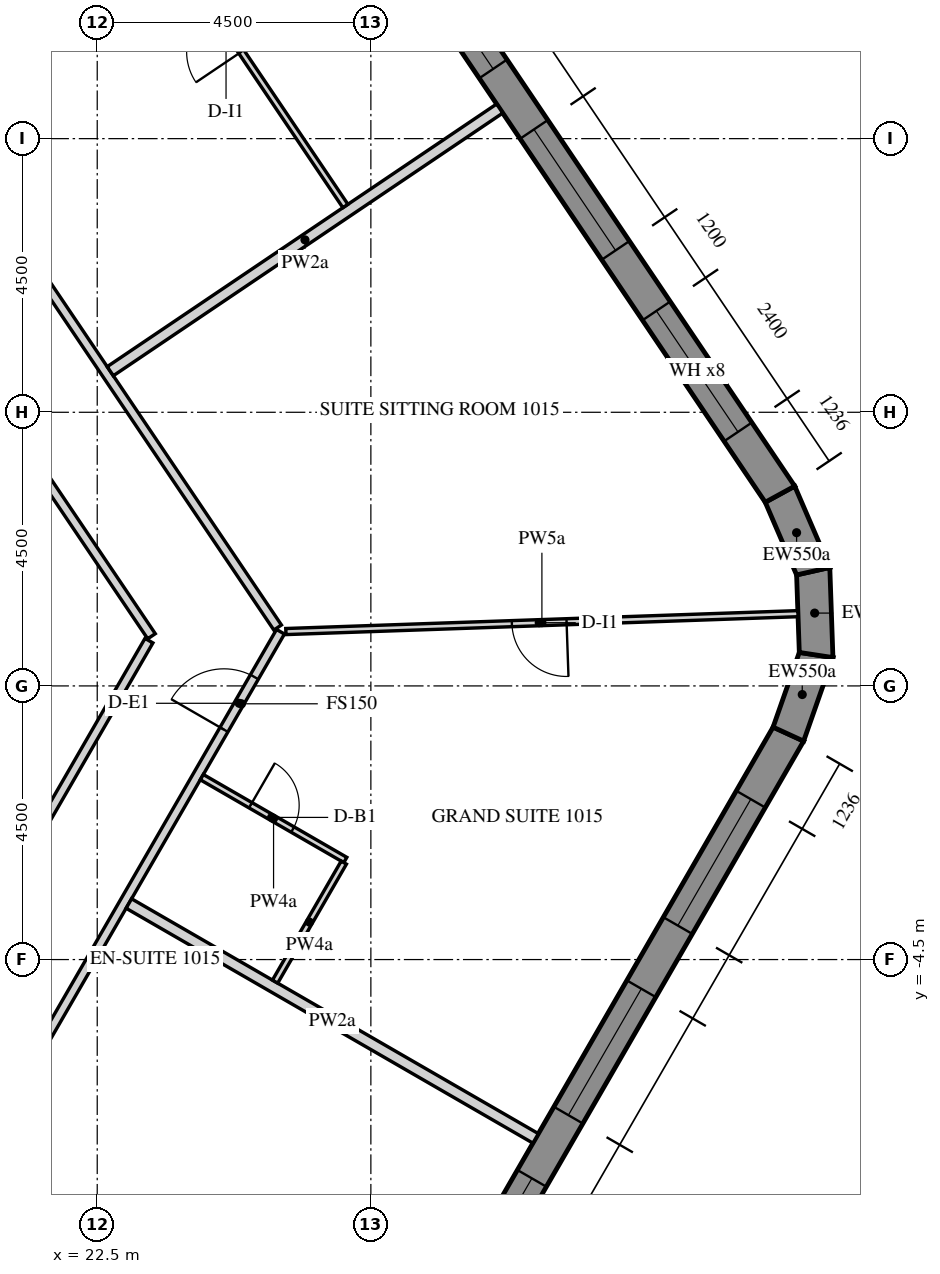
"""IFC4 building model, lengths in metres.
Left out: names, types, materials, properties, quantities, classifications, styles, units other than length and angle.
Written with IfcOpenShell. Run it as: python <this file> out.ifc"""

import sys

from ifc_helpers import new_model, si_unit, direction, frame, frame_2d, origin, place, context, subcontext, project, spatial, polyline, rectangle, outline, extrude, element, fill, save


model = new_model("IFC4")
c1 = context("Model", 3, precision=1e-05, world=origin(), true_north=direction((0.0, 1.0)))
c2 = subcontext(c1, "Body", "Model", "MODEL_VIEW")
j1 = project(units=[si_unit("LENGTHUNIT", "METRE"), si_unit("PLANEANGLEUNIT", "RADIAN")], contexts=[c1])
p1 = place(None, origin())
s1 = spatial("IfcSite", under=j1, at=p1, CompositionType="ELEMENT")
p2 = place(p1, origin())
s2 = spatial("IfcBuilding", under=s1, at=p2, CompositionType="ELEMENT")
p3 = place(p2, frame((0.0, 0.0, 142.8)))
s3 = spatial("IfcBuildingStorey", under=s2, at=p3, CompositionType="ELEMENT", Elevation=142.8)
p4 = place(p3, frame((18.83, -26.835, -0.15), z_axis=(0.0, 0.0, 1.0), x_axis=(0.500003800416, 0.866023209602, 0.0)))
e1 = element("IfcWall", 1, at=p4, inside=s3, PredefinedType="SOLIDWALL", context=c2, shape_type="SweptSolid", body=[
    extrude(outline(polyline([(-0.022, -0.275), (30.097, -0.275), (30.045, 0.275), (0.022, 0.275), (-0.022, -0.275)])), origin(), (0.0, 0.0, 1.0), 3.75),
])
p5 = place(p4, frame((1.236, 0.0, 1.05)))
e2 = element("IfcOpeningElement", 2, at=p5, cuts=e1, PredefinedType="OPENING", context=c2, shape_type="SweptSolid", body=[
    extrude(rectangle(XDim=2.4, YDim=2.4, at=frame_2d((1.2, 1.2))), frame((0.0, 0.285, 0.0), z_axis=(0.0, -1.0, 0.0), x_axis=(1.0, 0.0, 0.0)), (0.0, 0.0, 1.0), 0.57),
])
p6 = place(p4, frame((4.835, 0.0, 1.05)))
e3 = element("IfcOpeningElement", 3, at=p6, cuts=e1, PredefinedType="OPENING", context=c2, shape_type="SweptSolid", body=[
    extrude(rectangle(XDim=2.4, YDim=2.4, at=frame_2d((1.2, 1.2))), frame((0.0, 0.285, 0.0), z_axis=(0.0, -1.0, 0.0), x_axis=(1.0, 0.0, 0.0)), (0.0, 0.0, 1.0), 0.57),
])
p7 = place(p4, frame((8.436, 0.0, 1.05)))
e4 = element("IfcOpeningElement", 4, at=p7, cuts=e1, PredefinedType="OPENING", context=c2, shape_type="SweptSolid", body=[
    extrude(rectangle(XDim=2.4, YDim=2.4, at=frame_2d((1.2, 1.2))), frame((0.0, 0.285, 0.0), z_axis=(0.0, -1.0, 0.0), x_axis=(1.0, 0.0, 0.0)), (0.0, 0.0, 1.0), 0.57),
])
p8 = place(p4, frame((12.035, 0.0, 1.05)))
e5 = element("IfcOpeningElement", 5, at=p8, cuts=e1, PredefinedType="OPENING", context=c2, shape_type="SweptSolid", body=[
    extrude(rectangle(XDim=2.4, YDim=2.4, at=frame_2d((1.2, 1.2))), frame((0.0, 0.285, 0.0), z_axis=(0.0, -1.0, 0.0), x_axis=(1.0, 0.0, 0.0)), (0.0, 0.0, 1.0), 0.57),
])
p9 = place(p4, frame((15.635, 0.0, 1.05)))
e6 = element("IfcOpeningElement", 6, at=p9, cuts=e1, PredefinedType="OPENING", context=c2, shape_type="SweptSolid", body=[
    extrude(rectangle(XDim=2.4, YDim=2.4, at=frame_2d((1.2, 1.2))), frame((0.0, 0.285, 0.0), z_axis=(0.0, -1.0, 0.0), x_axis=(1.0, 0.0, 0.0)), (0.0, 0.0, 1.0), 0.57),
])
p10 = place(p4, frame((19.236, 0.0, 1.05)))
e7 = element("IfcOpeningElement", 7, at=p10, cuts=e1, PredefinedType="OPENING", context=c2, shape_type="SweptSolid", body=[
    extrude(rectangle(XDim=2.4, YDim=2.4, at=frame_2d((1.2, 1.2))), frame((0.0, 0.285, 0.0), z_axis=(0.0, -1.0, 0.0), x_axis=(1.0, 0.0, 0.0)), (0.0, 0.0, 1.0), 0.57),
])
p11 = place(p4, frame((22.835, 0.0, 1.05)))
e8 = element("IfcOpeningElement", 8, at=p11, cuts=e1, PredefinedType="OPENING", context=c2, shape_type="SweptSolid", body=[
    extrude(rectangle(XDim=2.4, YDim=2.4, at=frame_2d((1.2, 1.2))), frame((0.0, 0.285, 0.0), z_axis=(0.0, -1.0, 0.0), x_axis=(1.0, 0.0, 0.0)), (0.0, 0.0, 1.0), 0.57),
])
p12 = place(p4, frame((26.436, 0.0, 1.05)))
e9 = element("IfcOpeningElement", 9, at=p12, cuts=e1, PredefinedType="OPENING", context=c2, shape_type="SweptSolid", body=[
    extrude(rectangle(XDim=2.4, YDim=2.4, at=frame_2d((1.2, 1.2))), frame((0.0, 0.285, 0.0), z_axis=(0.0, -1.0, 0.0), x_axis=(1.0, 0.0, 0.0)), (0.0, 0.0, 1.0), 0.57),
])
p13 = place(p3, frame((33.866, -0.792, -0.15), z_axis=(0.0, 0.0, 1.0), x_axis=(0.33111537203, 0.943590276765, 0.0)))
e10 = element("IfcWall", 10, at=p13, inside=s3, PredefinedType="SOLIDWALL", context=c2, shape_type="SweptSolid", body=[
    extrude(outline(polyline([(-0.026, -0.275), (1.431, -0.275), (1.327, 0.275), (0.026, 0.275), (-0.026, -0.275)])), origin(), (0.0, 0.0, 1.0), 3.75),
])
p14 = place(p3, frame((34.323, 0.509, -0.15), z_axis=(0.0, 0.0, 1.0), x_axis=(-0.034876908462, 0.999391615562, 0.0)))
e11 = element("IfcWall", 11, at=p14, inside=s3, PredefinedType="SOLIDWALL", context=c2, shape_type="SweptSolid", body=[
    extrude(outline(polyline([(-0.052, -0.275), (1.431, -0.275), (1.327, 0.275), (0.052, 0.275), (-0.052, -0.275)])), origin(), (0.0, 0.0, 1.0), 3.75),
])
p15 = place(p3, frame((34.274, 1.887, -0.15), z_axis=(0.0, 0.0, 1.0), x_axis=(-0.396161342798, 0.918180913803, 0.0)))
e12 = element("IfcWall", 12, at=p15, inside=s3, PredefinedType="SOLIDWALL", context=c2, shape_type="SweptSolid", body=[
    extrude(outline(polyline([(-0.052, -0.275), (1.405, -0.275), (1.354, 0.275), (0.052, 0.275), (-0.052, -0.275)])), origin(), (0.0, 0.0, 1.0), 3.75),
])
p16 = place(p3, frame((33.728, 3.153, -0.15), z_axis=(0.0, 0.0, 1.0), x_axis=(-0.559192411416, 0.82903790445, 0.0)))
e13 = element("IfcWall", 13, at=p16, inside=s3, PredefinedType="SOLIDWALL", context=c2, shape_type="SweptSolid", body=[
    extrude(outline(polyline([(-0.026, -0.275), (30.093, -0.275), (30.048, 0.275), (0.026, 0.275), (-0.026, -0.275)])), origin(), (0.0, 0.0, 1.0), 3.75),
])
p17 = place(p16, frame((1.236, 0.0, 1.05)))
e14 = element("IfcOpeningElement", 14, at=p17, cuts=e13, PredefinedType="OPENING", context=c2, shape_type="SweptSolid", body=[
    extrude(rectangle(XDim=2.4, YDim=2.4, at=frame_2d((1.2, 1.2))), frame((0.0, 0.285, 0.0), z_axis=(0.0, -1.0, 0.0), x_axis=(1.0, 0.0, 0.0)), (0.0, 0.0, 1.0), 0.57),
])
p18 = place(p16, frame((4.835, 0.0, 1.05)))
e15 = element("IfcOpeningElement", 15, at=p18, cuts=e13, PredefinedType="OPENING", context=c2, shape_type="SweptSolid", body=[
    extrude(rectangle(XDim=2.4, YDim=2.4, at=frame_2d((1.2, 1.2))), frame((0.0, 0.285, 0.0), z_axis=(0.0, -1.0, 0.0), x_axis=(1.0, 0.0, 0.0)), (0.0, 0.0, 1.0), 0.57),
])
p19 = place(p16, frame((8.436, 0.0, 1.05)))
e16 = element("IfcOpeningElement", 16, at=p19, cuts=e13, PredefinedType="OPENING", context=c2, shape_type="SweptSolid", body=[
    extrude(rectangle(XDim=2.4, YDim=2.4, at=frame_2d((1.2, 1.2))), frame((0.0, 0.285, 0.0), z_axis=(0.0, -1.0, 0.0), x_axis=(1.0, 0.0, 0.0)), (0.0, 0.0, 1.0), 0.57),
])
p20 = place(p16, frame((12.035, 0.0, 1.05)))
e17 = element("IfcOpeningElement", 17, at=p20, cuts=e13, PredefinedType="OPENING", context=c2, shape_type="SweptSolid", body=[
    extrude(rectangle(XDim=2.4, YDim=2.4, at=frame_2d((1.2, 1.2))), frame((0.0, 0.285, 0.0), z_axis=(0.0, -1.0, 0.0), x_axis=(1.0, 0.0, 0.0)), (0.0, 0.0, 1.0), 0.57),
])
p21 = place(p16, frame((15.635, 0.0, 1.05)))
e18 = element("IfcOpeningElement", 18, at=p21, cuts=e13, PredefinedType="OPENING", context=c2, shape_type="SweptSolid", body=[
    extrude(rectangle(XDim=2.4, YDim=2.4, at=frame_2d((1.2, 1.2))), frame((0.0, 0.285, 0.0), z_axis=(0.0, -1.0, 0.0), x_axis=(1.0, 0.0, 0.0)), (0.0, 0.0, 1.0), 0.57),
])
p22 = place(p16, frame((19.236, 0.0, 1.05)))
e19 = element("IfcOpeningElement", 19, at=p22, cuts=e13, PredefinedType="OPENING", context=c2, shape_type="SweptSolid", body=[
    extrude(rectangle(XDim=2.4, YDim=2.4, at=frame_2d((1.2, 1.2))), frame((0.0, 0.285, 0.0), z_axis=(0.0, -1.0, 0.0), x_axis=(1.0, 0.0, 0.0)), (0.0, 0.0, 1.0), 0.57),
])
p23 = place(p16, frame((22.835, 0.0, 1.05)))
e20 = element("IfcOpeningElement", 20, at=p23, cuts=e13, PredefinedType="OPENING", context=c2, shape_type="SweptSolid", body=[
    extrude(rectangle(XDim=2.4, YDim=2.4, at=frame_2d((1.2, 1.2))), frame((0.0, 0.285, 0.0), z_axis=(0.0, -1.0, 0.0), x_axis=(1.0, 0.0, 0.0)), (0.0, 0.0, 1.0), 0.57),
])
p24 = place(p16, frame((26.436, 0.0, 1.05)))
e21 = element("IfcOpeningElement", 21, at=p24, cuts=e13, PredefinedType="OPENING", context=c2, shape_type="SweptSolid", body=[
    extrude(rectangle(XDim=2.4, YDim=2.4, at=frame_2d((1.2, 1.2))), frame((0.0, 0.285, 0.0), z_axis=(0.0, -1.0, 0.0), x_axis=(1.0, 0.0, 0.0)), (0.0, 0.0, 1.0), 0.57),
])
p25 = place(p3, frame((13.755, -19.475, 0.0), z_axis=(0.0, 0.0, 1.0), x_axis=(0.50000013933, 0.866025323342, 0.0)))
e22 = element("IfcWall", 22, at=p25, inside=s3, PredefinedType="PARTITIONING", context=c2, shape_type="SweptSolid", body=[
    extrude(rectangle(XDim=23.517, YDim=0.15, at=frame_2d((11.758, 0.0))), origin(), (0.0, 0.0, 1.0), 2.838),
])
p26 = place(p25, frame((4.456, 0.0, 0.0)))
e23 = element("IfcOpeningElement", 23, at=p26, cuts=e22, PredefinedType="OPENING", context=c2, shape_type="SweptSolid", body=[
    extrude(rectangle(XDim=1.0, YDim=2.1, at=frame_2d((0.5, 1.05))), frame((0.0, 0.085, 0.0), z_axis=(0.0, -1.0, 0.0), x_axis=(1.0, 0.0, 0.0)), (0.0, 0.0, 1.0), 0.17),
])
p27 = place(p25, frame((13.699, 0.0, 0.0)))
e24 = element("IfcOpeningElement", 24, at=p27, cuts=e22, PredefinedType="OPENING", context=c2, shape_type="SweptSolid", body=[
    extrude(rectangle(XDim=1.0, YDim=2.1, at=frame_2d((0.5, 1.05))), frame((0.0, 0.085, 0.0), z_axis=(0.0, -1.0, 0.0), x_axis=(1.0, 0.0, 0.0)), (0.0, 0.0, 1.0), 0.17),
])
p28 = place(p25, frame((21.658, 0.0, 0.0)))
e25 = element("IfcOpeningElement", 25, at=p28, cuts=e22, PredefinedType="OPENING", context=c2, shape_type="SweptSolid", body=[
    extrude(rectangle(XDim=1.0, YDim=2.1, at=frame_2d((0.5, 1.05))), frame((0.0, 0.085, 0.0), z_axis=(0.0, -1.0, 0.0), x_axis=(1.0, 0.0, 0.0)), (0.0, 0.0, 1.0), 0.17),
])
p29 = place(p3, frame((25.467, 0.96, 0.0), z_axis=(0.0, 0.0, 1.0), x_axis=(-0.559200743185, 0.829032284547, 0.0)))
e26 = element("IfcWall", 26, at=p29, inside=s3, PredefinedType="PARTITIONING", context=c2, shape_type="SweptSolid", body=[
    extrude(rectangle(XDim=21.668, YDim=0.15, at=frame_2d((10.834, 0.0))), origin(), (0.0, 0.0, 1.0), 2.838),
])
p30 = place(p29, frame((10.434, 0.0, 0.0)))
e27 = element("IfcOpeningElement", 27, at=p30, cuts=e26, PredefinedType="OPENING", context=c2, shape_type="SweptSolid", body=[
    extrude(rectangle(XDim=1.0, YDim=2.1, at=frame_2d((0.5, 1.05))), frame((0.0, 0.085, 0.0), z_axis=(0.0, -1.0, 0.0), x_axis=(1.0, 0.0, 0.0)), (0.0, 0.0, 1.0), 0.17),
])
p31 = place(p3, frame((17.879, 8.99, 0.0), z_axis=(0.0, 0.0, 1.0), x_axis=(0.559189565351, -0.829039824136, 0.0)))
e28 = element("IfcWall", 28, at=p31, inside=s3, PredefinedType="PARTITIONING", context=c2, shape_type="SweptSolid", body=[
    extrude(rectangle(XDim=9.859, YDim=0.15, at=frame_2d((4.929, 0.0))), origin(), (0.0, 0.0, 1.0), 2.838),
])
p32 = place(p3, frame((23.351, 0.745, 0.0), z_axis=(0.0, 0.0, 1.0), x_axis=(-0.500009458068, -0.866019943097, 0.0)))
e29 = element("IfcWall", 29, at=p32, inside=s3, PredefinedType="PARTITIONING", context=c2, shape_type="SweptSolid", body=[
    extrude(rectangle(XDim=11.241, YDim=0.15, at=frame_2d((5.621, 0.0))), origin(), (0.0, 0.0, 1.0), 2.838),
])
p33 = place(p32, frame((5.171, 0.0, 0.0)))
e30 = element("IfcOpeningElement", 30, at=p33, cuts=e29, PredefinedType="OPENING", context=c2, shape_type="SweptSolid", body=[
    extrude(rectangle(XDim=0.9, YDim=2.1, at=frame_2d((0.45, 1.05))), frame((0.0, 0.085, 0.0), z_axis=(0.0, -1.0, 0.0), x_axis=(1.0, 0.0, 0.0)), (0.0, 0.0, 1.0), 0.17),
])
p34 = place(p3, frame((29.71, -7.441, 0.0), z_axis=(0.0, 0.0, 1.0), x_axis=(-0.866019273868, 0.500010617176, 0.0)))
e31 = element("IfcWall", 31, at=p34, inside=s3, PredefinedType="PARTITIONING", context=c2, shape_type="SweptSolid", body=[
    extrude(rectangle(XDim=7.725, YDim=0.18, at=frame_2d((3.862, 0.0))), origin(), (0.0, 0.0, 1.0), 2.838),
])
p35 = place(p3, frame((24.22, -1.5, 0.0), z_axis=(0.0, 0.0, 1.0), x_axis=(0.866012511928, -0.500022328685, 0.0)))
e32 = element("IfcWall", 32, at=p35, inside=s3, PredefinedType="PARTITIONING", context=c2, shape_type="SweptSolid", body=[
    extrude(rectangle(XDim=2.725, YDim=0.1, at=frame_2d((1.363, 0.0))), origin(), (0.0, 0.0, 1.0), 2.838),
])
p36 = place(p35, frame((0.925, 0.0, 0.0)))
e33 = element("IfcOpeningElement", 33, at=p36, cuts=e32, PredefinedType="OPENING", context=c2, shape_type="SweptSolid", body=[
    extrude(rectangle(XDim=0.8, YDim=2.1, at=frame_2d((0.4, 1.05))), frame((0.0, 0.06, 0.0), z_axis=(0.0, -1.0, 0.0), x_axis=(1.0, 0.0, 0.0)), (0.0, 0.0, 1.0), 0.12),
])
p37 = place(p3, frame((26.555, -2.906, 0.0), z_axis=(0.0, 0.0, 1.0), x_axis=(-0.500077800282, -0.865980481111, 0.0)))
e34 = element("IfcWall", 34, at=p37, inside=s3, PredefinedType="PARTITIONING", context=c2, shape_type="SweptSolid", body=[
    extrude(rectangle(XDim=2.26, YDim=0.1, at=frame_2d((1.13, 0.0))), origin(), (0.0, 0.0, 1.0), 2.838),
])
p38 = place(p3, frame((34.023, 1.188, 0.0), z_axis=(0.0, 0.0, 1.0), x_axis=(-0.999390379298, -0.03491231539, 0.0)))
e35 = element("IfcWall", 35, at=p38, inside=s3, PredefinedType="PARTITIONING", context=c2, shape_type="SweptSolid", body=[
    extrude(rectangle(XDim=8.427, YDim=0.1, at=frame_2d((4.213, 0.0))), origin(), (0.0, 0.0, 1.0), 2.838),
])
p39 = place(p38, frame((3.808, 0.0, 0.0)))
e36 = element("IfcOpeningElement", 36, at=p39, cuts=e35, PredefinedType="OPENING", context=c2, shape_type="SweptSolid", body=[
    extrude(rectangle(XDim=0.9, YDim=2.1, at=frame_2d((0.45, 1.05))), frame((0.0, 0.06, 0.0), z_axis=(0.0, -1.0, 0.0), x_axis=(1.0, 0.0, 0.0)), (0.0, 0.0, 1.0), 0.12),
])
p40 = place(p3, frame((29.119, 9.495, 0.0), z_axis=(0.0, 0.0, 1.0), x_axis=(-0.82903328576, -0.559199258853, 0.0)))
e37 = element("IfcWall", 37, at=p40, inside=s3, PredefinedType="PARTITIONING", context=c2, shape_type="SweptSolid", body=[
    extrude(rectangle(XDim=7.725, YDim=0.18, at=frame_2d((3.863, 0.0))), origin(), (0.0, 0.0, 1.0), 2.838),
])
p41 = place(p3, frame((26.581, 7.892, 0.0), z_axis=(0.0, 0.0, 1.0), x_axis=(-0.559185029686, 0.829042883435, 0.0)))
e38 = element("IfcWall", 38, at=p41, inside=s3, PredefinedType="PARTITIONING", context=c2, shape_type="SweptSolid", body=[
    extrude(rectangle(XDim=7.11, YDim=0.1, at=frame_2d((3.555, 0.0))), origin(), (0.0, 0.0, 1.0), 2.838),
])
p42 = place(p41, frame((3.06, 0.0, 0.0)))
e39 = element("IfcOpeningElement", 39, at=p42, cuts=e38, PredefinedType="OPENING", context=c2, shape_type="SweptSolid", body=[
    extrude(rectangle(XDim=0.9, YDim=2.1, at=frame_2d((0.45, 1.05))), frame((0.0, 0.06, 0.0), z_axis=(0.0, -1.0, 0.0), x_axis=(1.0, 0.0, 0.0)), (0.0, 0.0, 1.0), 0.12),
])
p43 = place(p10, frame((0.0, 0.205, 0.0)))
e40 = element("IfcWindow", 40, at=p43, inside=s3, PartitioningType="DOUBLE_PANEL_VERTICAL", PredefinedType="WINDOW", context=c2, shape_type="SweptSolid", body=[
    extrude(rectangle(XDim=2.4, YDim=2.4, at=frame_2d((1.2, 1.2))), frame((0.0, 0.03, 0.0), z_axis=(0.0, -1.0, 0.0), x_axis=(1.0, 0.0, 0.0)), (0.0, 0.0, 1.0), 0.06),
])
fill(e7, e40)
p44 = place(p11, frame((0.0, 0.205, 0.0)))
e41 = element("IfcWindow", 41, at=p44, inside=s3, PartitioningType="DOUBLE_PANEL_VERTICAL", PredefinedType="WINDOW", context=c2, shape_type="SweptSolid", body=[
    extrude(rectangle(XDim=2.4, YDim=2.4, at=frame_2d((1.2, 1.2))), frame((0.0, 0.03, 0.0), z_axis=(0.0, -1.0, 0.0), x_axis=(1.0, 0.0, 0.0)), (0.0, 0.0, 1.0), 0.06),
])
fill(e8, e41)
p45 = place(p12, frame((0.0, 0.205, 0.0)))
e42 = element("IfcWindow", 42, at=p45, inside=s3, PartitioningType="DOUBLE_PANEL_VERTICAL", PredefinedType="WINDOW", context=c2, shape_type="SweptSolid", body=[
    extrude(rectangle(XDim=2.4, YDim=2.4, at=frame_2d((1.2, 1.2))), frame((0.0, 0.03, 0.0), z_axis=(0.0, -1.0, 0.0), x_axis=(1.0, 0.0, 0.0)), (0.0, 0.0, 1.0), 0.06),
])
fill(e9, e42)
p46 = place(p17, frame((0.0, 0.205, 0.0)))
e43 = element("IfcWindow", 43, at=p46, inside=s3, PartitioningType="DOUBLE_PANEL_VERTICAL", PredefinedType="WINDOW", context=c2, shape_type="SweptSolid", body=[
    extrude(rectangle(XDim=2.4, YDim=2.4, at=frame_2d((1.2, 1.2))), frame((0.0, 0.03, 0.0), z_axis=(0.0, -1.0, 0.0), x_axis=(1.0, 0.0, 0.0)), (0.0, 0.0, 1.0), 0.06),
])
fill(e14, e43)
p47 = place(p18, frame((0.0, 0.205, 0.0)))
e44 = element("IfcWindow", 44, at=p47, inside=s3, PartitioningType="DOUBLE_PANEL_VERTICAL", PredefinedType="WINDOW", context=c2, shape_type="SweptSolid", body=[
    extrude(rectangle(XDim=2.4, YDim=2.4, at=frame_2d((1.2, 1.2))), frame((0.0, 0.03, 0.0), z_axis=(0.0, -1.0, 0.0), x_axis=(1.0, 0.0, 0.0)), (0.0, 0.0, 1.0), 0.06),
])
fill(e15, e44)
p48 = place(p19, frame((0.0, 0.205, 0.0)))
e45 = element("IfcWindow", 45, at=p48, inside=s3, PartitioningType="DOUBLE_PANEL_VERTICAL", PredefinedType="WINDOW", context=c2, shape_type="SweptSolid", body=[
    extrude(rectangle(XDim=2.4, YDim=2.4, at=frame_2d((1.2, 1.2))), frame((0.0, 0.03, 0.0), z_axis=(0.0, -1.0, 0.0), x_axis=(1.0, 0.0, 0.0)), (0.0, 0.0, 1.0), 0.06),
])
fill(e16, e45)
p49 = place(p28, origin())
e46 = element("IfcDoor", 46, at=p49, inside=s3, OperationType="SINGLE_SWING_RIGHT", PredefinedType="DOOR", context=c2, shape_type="SweptSolid", body=[
    extrude(rectangle(XDim=1.0, YDim=2.1, at=frame_2d((0.5, 1.05))), frame((0.0, 0.025, 0.0), z_axis=(0.0, -1.0, 0.0), x_axis=(1.0, 0.0, 0.0)), (0.0, 0.0, 1.0), 0.05),
])
fill(e25, e46)
p50 = place(p36, origin())
e47 = element("IfcDoor", 47, at=p50, inside=s3, OperationType="SINGLE_SWING_RIGHT", PredefinedType="DOOR", context=c2, shape_type="SweptSolid", body=[
    extrude(rectangle(XDim=0.8, YDim=2.1, at=frame_2d((0.4, 1.05))), frame((0.0, 0.025, 0.0), z_axis=(0.0, -1.0, 0.0), x_axis=(1.0, 0.0, 0.0)), (0.0, 0.0, 1.0), 0.05),
])
fill(e33, e47)
p51 = place(p39, origin())
e48 = element("IfcDoor", 48, at=p51, inside=s3, OperationType="SINGLE_SWING_LEFT", PredefinedType="DOOR", context=c2, shape_type="SweptSolid", body=[
    extrude(rectangle(XDim=0.9, YDim=2.1, at=frame_2d((0.45, 1.05))), frame((0.0, 0.025, 0.0), z_axis=(0.0, -1.0, 0.0), x_axis=(1.0, 0.0, 0.0)), (0.0, 0.0, 1.0), 0.05),
])
fill(e36, e48)
p52 = place(p42, origin())
e49 = element("IfcDoor", 49, at=p52, inside=s3, OperationType="SINGLE_SWING_RIGHT", PredefinedType="DOOR", context=c2, shape_type="SweptSolid", body=[
    extrude(rectangle(XDim=0.9, YDim=2.1, at=frame_2d((0.45, 1.05))), frame((0.0, 0.025, 0.0), z_axis=(0.0, -1.0, 0.0), x_axis=(1.0, 0.0, 0.0)), (0.0, 0.0, 1.0), 0.05),
])
fill(e39, e49)
save(model, sys.argv[1])
